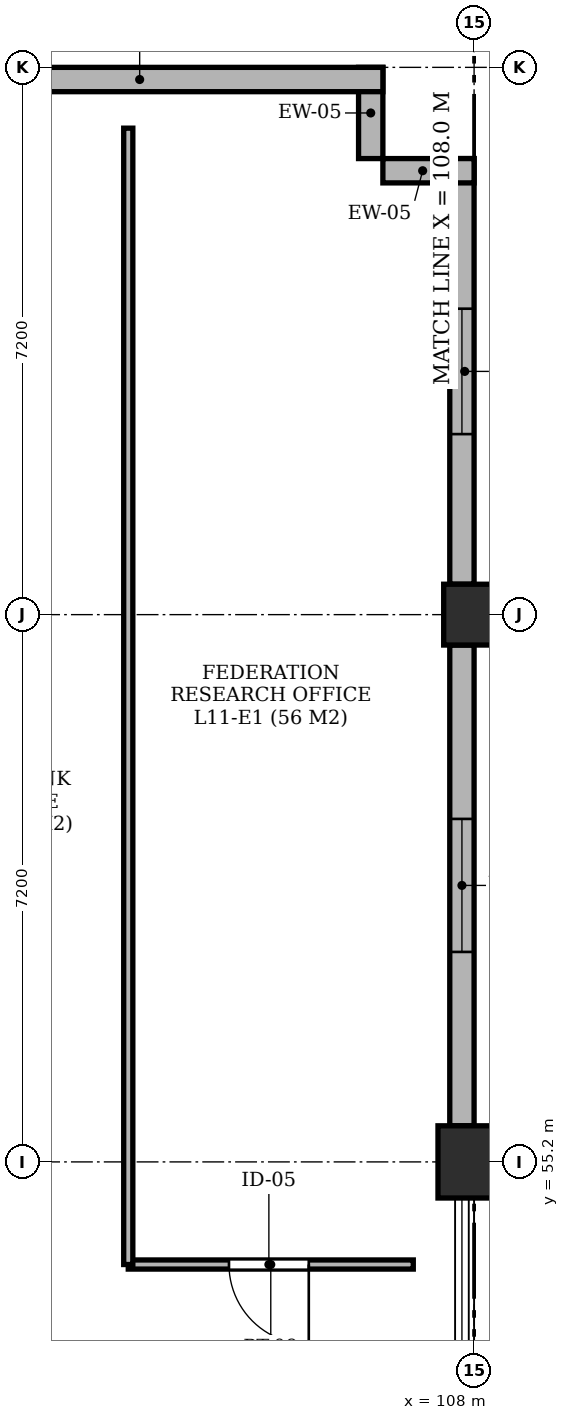
"""IFC4 building model, lengths in metres.
Left out: names, types, materials, properties, quantities, classifications, styles, units other than length and angle.
Written with IfcOpenShell. Run it as: python <this file> out.ifc"""

import sys

from ifc_helpers import new_model, si_unit, direction, frame, frame_2d, origin, origin_2d, place, context, subcontext, project, spatial, rectangle, extrude, element, fill, save


model = new_model("IFC4")
c1 = context("Model", 3, precision=1e-05, world=origin(), true_north=direction((0.0, 1.0)))
c2 = subcontext(c1, "Body", "Model", "MODEL_VIEW")
j1 = project(units=[si_unit("LENGTHUNIT", "METRE"), si_unit("PLANEANGLEUNIT", "RADIAN")], contexts=[c1])
p1 = place(None, origin())
s1 = spatial("IfcSite", under=j1, at=p1, CompositionType="ELEMENT")
p2 = place(p1, origin())
s2 = spatial("IfcBuilding", under=s1, at=p2, CompositionType="ELEMENT")
p3 = place(p2, frame((0.0, 0.0, 47.05)))
s3 = spatial("IfcBuildingStorey", under=s2, at=p3, CompositionType="ELEMENT", Elevation=47.05)
p4 = place(p3, frame((108.0, 55.2, -0.23), z_axis=(0.0, 0.0, 1.0), x_axis=(1.0, 0.0, 0.0)))
e1 = element("IfcColumn", 1, at=p4, inside=s3, PredefinedType="COLUMN", context=c2, shape_type="SweptSolid", body=[
    extrude(rectangle(XDim=0.95, YDim=0.95, at=origin_2d()), origin(), (0.0, 0.0, 1.0), 3.25),
])
p5 = place(p3, frame((108.0, 62.4, -0.23), z_axis=(0.0, 0.0, 1.0), x_axis=(1.0, 0.0, 0.0)))
e2 = element("IfcColumn", 2, at=p5, inside=s3, PredefinedType="COLUMN", context=c2, shape_type="SweptSolid", body=[
    extrude(rectangle(XDim=0.8, YDim=0.8, at=origin_2d()), origin(), (0.0, 0.0, 1.0), 3.25),
])
p6 = place(p3, frame((107.84, 55.675, 0.0), z_axis=(0.0, 0.0, 1.0), x_axis=(0.0, 1.0, 0.0)))
e3 = element("IfcWall", 3, at=p6, inside=s3, PredefinedType="SOLIDWALL", context=c2, shape_type="SweptSolid", body=[
    extrude(rectangle(XDim=6.325, YDim=0.32, at=frame_2d((3.163, 0.0))), origin(), (0.0, 0.0, 1.0), 2.53),
])
p7 = place(p6, frame((2.288, 0.0, 0.62)))
e4 = element("IfcOpeningElement", 4, at=p7, cuts=e3, PredefinedType="OPENING", context=c2, shape_type="SweptSolid", body=[
    extrude(rectangle(XDim=1.75, YDim=1.81, at=frame_2d((0.875, 0.905))), frame((0.0, 0.172, 0.0), z_axis=(0.0, -1.0, 0.0), x_axis=(1.0, 0.0, 0.0)), (0.0, 0.0, 1.0), 0.344),
])
p8 = place(p3, frame((107.84, 62.8, 0.0), z_axis=(0.0, 0.0, 1.0), x_axis=(0.0, 1.0, 0.0)))
e5 = element("IfcWall", 5, at=p8, inside=s3, PredefinedType="SOLIDWALL", context=c2, shape_type="SweptSolid", body=[
    extrude(rectangle(XDim=5.6, YDim=0.32, at=frame_2d((2.8, 0.0))), origin(), (0.0, 0.0, 1.0), 2.53),
])
p9 = place(p8, frame((1.975, 0.0, 0.62)))
e6 = element("IfcOpeningElement", 6, at=p9, cuts=e5, PredefinedType="OPENING", context=c2, shape_type="SweptSolid", body=[
    extrude(rectangle(XDim=1.65, YDim=1.81, at=frame_2d((0.825, 0.905))), frame((0.0, 0.172, 0.0), z_axis=(0.0, -1.0, 0.0), x_axis=(1.0, 0.0, 0.0)), (0.0, 0.0, 1.0), 0.344),
])
p10 = place(p3, frame((108.0, 68.24, 0.0), z_axis=(0.0, 0.0, 1.0), x_axis=(-1.0, 0.0, 0.0)))
e7 = element("IfcWall", 7, at=p10, inside=s3, PredefinedType="SOLIDWALL", context=c2, shape_type="SweptSolid", body=[
    extrude(rectangle(XDim=1.2, YDim=0.32, at=frame_2d((0.6, 0.0))), origin(), (0.0, 0.0, 1.0), 2.53),
])
p11 = place(p3, frame((106.64, 68.4, 0.0), z_axis=(0.0, 0.0, 1.0), x_axis=(0.0, 1.0, 0.0)))
e8 = element("IfcWall", 8, at=p11, inside=s3, PredefinedType="SOLIDWALL", context=c2, shape_type="SweptSolid", body=[
    extrude(rectangle(XDim=1.2, YDim=0.32, at=frame_2d((0.6, 0.0))), origin(), (0.0, 0.0, 1.0), 2.53),
])
p12 = place(p3, frame((106.8, 69.44, 0.0), z_axis=(0.0, 0.0, 1.0), x_axis=(-1.0, 0.0, 0.0)))
e9 = element("IfcWall", 9, at=p12, inside=s3, PredefinedType="SOLIDWALL", context=c2, shape_type="SweptSolid", body=[
    extrude(rectangle(XDim=6.4, YDim=0.32, at=frame_2d((3.2, 0.0))), origin(), (0.0, 0.0, 1.0), 2.53),
])
p13 = place(p12, frame((4.75, 0.0, 0.62)))
e10 = element("IfcOpeningElement", 10, at=p13, cuts=e9, PredefinedType="OPENING", context=c2, shape_type="SweptSolid", body=[
    extrude(rectangle(XDim=1.2, YDim=1.65, at=frame_2d((0.6, 0.825))), frame((0.0, 0.172, 0.0), z_axis=(0.0, -1.0, 0.0), x_axis=(1.0, 0.0, 0.0)), (0.0, 0.0, 1.0), 0.344),
])
p14 = place(p3, frame((103.45, 53.85, 0.0), z_axis=(0.0, 0.0, 1.0), x_axis=(1.0, 0.0, 0.0)))
e11 = element("IfcWall", 11, at=p14, inside=s3, PredefinedType="PARTITIONING", context=c2, shape_type="SweptSolid", body=[
    extrude(rectangle(XDim=3.75, YDim=0.12, at=frame_2d((1.875, 0.0))), origin(), (0.0, 0.0, 1.0), 2.53),
])
p15 = place(p14, frame((1.325, 0.0, 0.0)))
e12 = element("IfcOpeningElement", 12, at=p15, cuts=e11, PredefinedType="OPENING", context=c2, shape_type="SweptSolid", body=[
    extrude(rectangle(XDim=1.05, YDim=2.15, at=frame_2d((0.525, 1.075))), frame((0.0, 0.072, 0.0), z_axis=(0.0, -1.0, 0.0), x_axis=(1.0, 0.0, 0.0)), (0.0, 0.0, 1.0), 0.144),
])
p16 = place(p3, frame((103.45, 53.85, 0.0), z_axis=(0.0, 0.0, 1.0), x_axis=(0.0, 1.0, 0.0)))
e13 = element("IfcWall", 13, at=p16, inside=s3, PredefinedType="PARTITIONING", context=c2, shape_type="SweptSolid", body=[
    extrude(rectangle(XDim=14.95, YDim=0.12, at=frame_2d((7.475, 0.0))), origin(), (0.0, 0.0, 1.0), 2.53),
])
p17 = place(p7, origin())
e14 = element("IfcWindow", 14, at=p17, inside=s3, PartitioningType="SINGLE_PANEL", PredefinedType="WINDOW", context=c2, shape_type="SweptSolid", body=[
    extrude(rectangle(XDim=1.75, YDim=1.81, at=frame_2d((0.875, 0.905))), frame((0.0, 0.03, 0.0), z_axis=(0.0, -1.0, 0.0), x_axis=(1.0, 0.0, 0.0)), (0.0, 0.0, 1.0), 0.06),
])
fill(e4, e14)
p18 = place(p9, origin())
e15 = element("IfcWindow", 15, at=p18, inside=s3, PartitioningType="SINGLE_PANEL", PredefinedType="WINDOW", context=c2, shape_type="SweptSolid", body=[
    extrude(rectangle(XDim=1.65, YDim=1.81, at=frame_2d((0.825, 0.905))), frame((0.0, 0.03, 0.0), z_axis=(0.0, -1.0, 0.0), x_axis=(1.0, 0.0, 0.0)), (0.0, 0.0, 1.0), 0.06),
])
fill(e6, e15)
p19 = place(p15, frame((1.05, 0.0, 0.0), z_axis=(0.0, 0.0, 1.0), x_axis=(-1.0, 0.0, 0.0)))
e16 = element("IfcDoor", 16, at=p19, inside=s3, OperationType="SINGLE_SWING_RIGHT", PredefinedType="DOOR", context=c2, shape_type="SweptSolid", body=[
    extrude(rectangle(XDim=1.05, YDim=2.15, at=frame_2d((0.525, 1.075))), frame((0.0, 0.025, 0.0), z_axis=(0.0, -1.0, 0.0), x_axis=(1.0, 0.0, 0.0)), (0.0, 0.0, 1.0), 0.05),
])
fill(e12, e16)
save(model, sys.argv[1])
